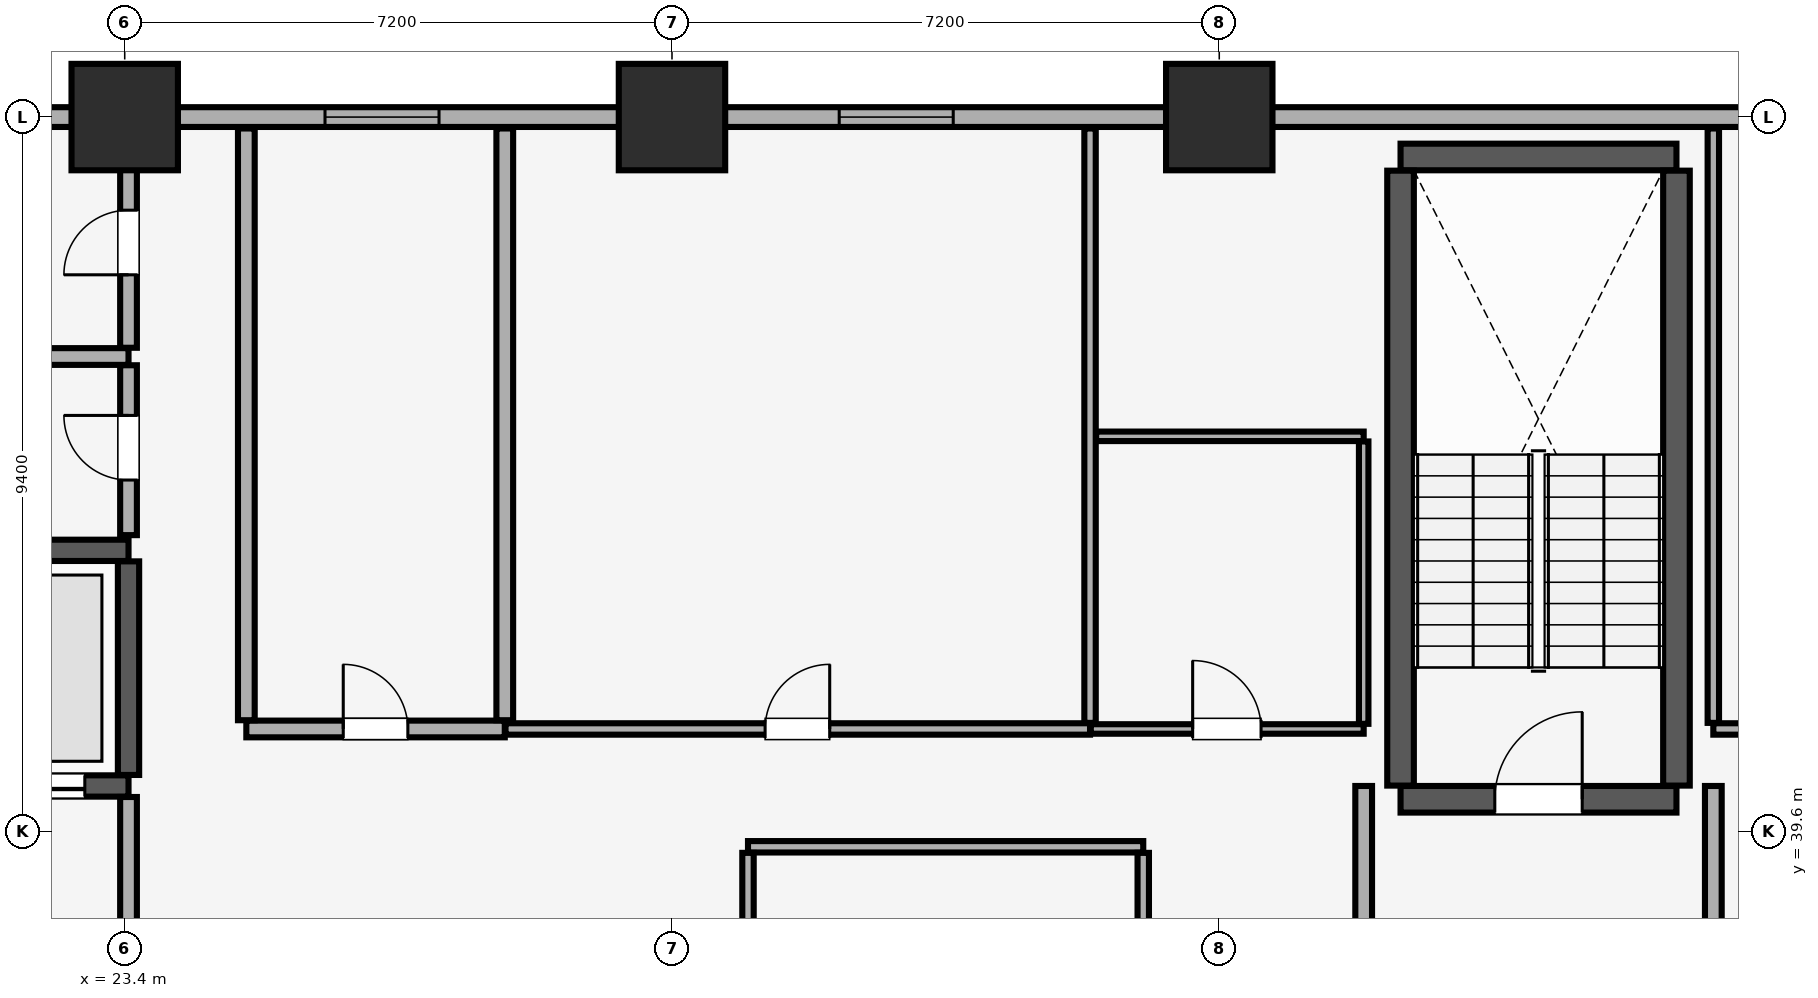
"""IFC4 building model, lengths in metres.
Left out: names, types, materials, properties, quantities, classifications, styles, units other than length and angle.
Written with IfcOpenShell. Run it as: python <this file> out.ifc"""

import sys

from ifc_helpers import new_model, si_unit, direction, frame, frame_2d, origin, origin_2d, place, context, subcontext, project, spatial, rectangle, extrude, element, fill, save


model = new_model("IFC4")
c1 = context("Model", 3, precision=1e-05, world=origin(), true_north=direction((0.0, 1.0)))
c2 = subcontext(c1, "Body", "Model", "MODEL_VIEW")
j1 = project(units=[si_unit("LENGTHUNIT", "METRE"), si_unit("PLANEANGLEUNIT", "RADIAN")], contexts=[c1])
p1 = place(None, origin())
s1 = spatial("IfcSite", under=j1, at=p1, CompositionType="ELEMENT")
p2 = place(p1, origin())
s2 = spatial("IfcBuilding", under=s1, at=p2, CompositionType="ELEMENT")
p3 = place(p2, frame((0.0, 0.0, 57.65)))
s3 = spatial("IfcBuildingStorey", under=s2, at=p3, CompositionType="ELEMENT", Elevation=57.65)
for number, where, z_axis, x_axis in (
    (1, (23.4, 49.0, 0.0), (0.0, 0.0, 1.0), (1.0, 0.0, 0.0)),
    (2, (30.6, 49.0, 0.0), (0.0, 0.0, 1.0), (1.0, 0.0, 0.0)),
    (3, (37.8, 49.0, 0.0), (0.0, 0.0, 1.0), (1.0, 0.0, 0.0)),
):
    element("IfcColumn", number, at=place(p3, frame(where, z_axis=z_axis, x_axis=x_axis)), inside=s3, PredefinedType="COLUMN", context=c2, shape_type="SweptSolid", body=[
        extrude(rectangle(XDim=1.4, YDim=1.4, at=origin_2d()), origin(), (0.0, 0.0, 1.0), 3.51),
    ])
p4 = place(p3, frame((79.8, 49.0, 0.0), z_axis=(0.0, 0.0, 1.0), x_axis=(-1.0, 0.0, 0.0)))
e4 = element("IfcWall", 4, at=p4, inside=s3, PredefinedType="SOLIDWALL", context=c2, shape_type="SweptSolid", body=[
    extrude(rectangle(XDim=75.6, YDim=0.26, at=frame_2d((37.8, 0.0))), origin(), (0.0, 0.0, 1.0), 2.56),
])
p5 = place(p4, frame((72.565, 0.0, 0.85)))
e5 = element("IfcOpeningElement", 5, at=p5, cuts=e4, PredefinedType="OPENING", context=c2, shape_type="SweptSolid", body=[
    extrude(rectangle(XDim=1.5, YDim=1.4, at=frame_2d((0.75, 0.7))), frame((0.0, 0.14, 0.0), z_axis=(0.0, -1.0, 0.0), x_axis=(1.0, 0.0, 0.0)), (0.0, 0.0, 1.0), 0.28),
])
p6 = place(p4, frame((67.45, 0.0, 0.85)))
e6 = element("IfcOpeningElement", 6, at=p6, cuts=e4, PredefinedType="OPENING", context=c2, shape_type="SweptSolid", body=[
    extrude(rectangle(XDim=1.5, YDim=1.4, at=frame_2d((0.75, 0.7))), frame((0.0, 0.14, 0.0), z_axis=(0.0, -1.0, 0.0), x_axis=(1.0, 0.0, 0.0)), (0.0, 0.0, 1.0), 0.28),
])
p7 = place(p4, frame((7.6, 0.0, 0.85)))
e7 = element("IfcOpeningElement", 7, at=p7, cuts=e4, PredefinedType="OPENING", context=c2, shape_type="SweptSolid", body=[
    extrude(rectangle(XDim=1.5, YDim=1.4, at=frame_2d((0.75, 0.7))), frame((0.0, 0.14, 0.0), z_axis=(0.0, -1.0, 0.0), x_axis=(1.0, 0.0, 0.0)), (0.0, 0.0, 1.0), 0.28),
])
p8 = place(p4, frame((1.535, 0.0, 0.85)))
e8 = element("IfcOpeningElement", 8, at=p8, cuts=e4, PredefinedType="OPENING", context=c2, shape_type="SweptSolid", body=[
    extrude(rectangle(XDim=1.5, YDim=1.4, at=frame_2d((0.75, 0.7))), frame((0.0, 0.14, 0.0), z_axis=(0.0, -1.0, 0.0), x_axis=(1.0, 0.0, 0.0)), (0.0, 0.0, 1.0), 0.28),
])
p9 = place(p4, frame((52.265, 0.0, 0.9)))
e9 = element("IfcOpeningElement", 9, at=p9, cuts=e4, PredefinedType="OPENING", context=c2, shape_type="SweptSolid", body=[
    extrude(rectangle(XDim=1.5, YDim=1.4, at=frame_2d((0.75, 0.7))), frame((0.0, 0.14, 0.0), z_axis=(0.0, -1.0, 0.0), x_axis=(1.0, 0.0, 0.0)), (0.0, 0.0, 1.0), 0.28),
])
p10 = place(p4, frame((45.5, 0.0, 0.9)))
e10 = element("IfcOpeningElement", 10, at=p10, cuts=e4, PredefinedType="OPENING", context=c2, shape_type="SweptSolid", body=[
    extrude(rectangle(XDim=1.5, YDim=1.4, at=frame_2d((0.75, 0.7))), frame((0.0, 0.14, 0.0), z_axis=(0.0, -1.0, 0.0), x_axis=(1.0, 0.0, 0.0)), (0.0, 0.0, 1.0), 0.28),
])
p11 = place(p4, frame((31.05, 0.0, 0.9)))
e11 = element("IfcOpeningElement", 11, at=p11, cuts=e4, PredefinedType="OPENING", context=c2, shape_type="SweptSolid", body=[
    extrude(rectangle(XDim=1.5, YDim=1.4, at=frame_2d((0.75, 0.7))), frame((0.0, 0.14, 0.0), z_axis=(0.0, -1.0, 0.0), x_axis=(1.0, 0.0, 0.0)), (0.0, 0.0, 1.0), 0.28),
])
p12 = place(p4, frame((27.85, 0.0, 0.9)))
e12 = element("IfcOpeningElement", 12, at=p12, cuts=e4, PredefinedType="OPENING", context=c2, shape_type="SweptSolid", body=[
    extrude(rectangle(XDim=1.5, YDim=1.4, at=frame_2d((0.75, 0.7))), frame((0.0, 0.14, 0.0), z_axis=(0.0, -1.0, 0.0), x_axis=(1.0, 0.0, 0.0)), (0.0, 0.0, 1.0), 0.28),
])
p13 = place(p4, frame((23.485, 0.0, 0.9)))
e13 = element("IfcOpeningElement", 13, at=p13, cuts=e4, PredefinedType="OPENING", context=c2, shape_type="SweptSolid", body=[
    extrude(rectangle(XDim=1.5, YDim=1.4, at=frame_2d((0.75, 0.7))), frame((0.0, 0.14, 0.0), z_axis=(0.0, -1.0, 0.0), x_axis=(1.0, 0.0, 0.0)), (0.0, 0.0, 1.0), 0.28),
])
p14 = place(p3, frame((40.185, 40.025, 0.0), z_axis=(0.0, 0.0, 1.0), x_axis=(1.0, 0.0, 0.0)))
e14 = element("IfcWall", 14, at=p14, inside=s3, PredefinedType="SHEAR", context=c2, shape_type="SweptSolid", body=[
    extrude(rectangle(XDim=3.63, YDim=0.35, at=frame_2d((1.815, 0.0))), origin(), (0.0, 0.0, 1.0), 3.51),
])
p15 = place(p14, frame((1.24, 0.0, 0.0)))
e15 = element("IfcOpeningElement", 15, at=p15, cuts=e14, PredefinedType="OPENING", context=c2, shape_type="SweptSolid", body=[
    extrude(rectangle(XDim=1.15, YDim=2.15, at=frame_2d((0.575, 1.075))), frame((0.0, 0.185, 0.0), z_axis=(0.0, -1.0, 0.0), x_axis=(1.0, 0.0, 0.0)), (0.0, 0.0, 1.0), 0.37),
])
p16 = place(p3, frame((40.185, 48.475, 0.0), z_axis=(0.0, 0.0, 1.0), x_axis=(1.0, 0.0, 0.0)))
e16 = element("IfcWall", 16, at=p16, inside=s3, PredefinedType="SHEAR", context=c2, shape_type="SweptSolid", body=[
    extrude(rectangle(XDim=3.63, YDim=0.35, at=frame_2d((1.815, 0.0))), origin(), (0.0, 0.0, 1.0), 3.51),
])
for number, where, z_axis, x_axis in (
    (17, (40.185, 40.205, 0.0), (0.0, 0.0, 1.0), (0.0, 1.0, 0.0)),
    (18, (43.815, 40.205, 0.0), (0.0, 0.0, 1.0), (0.0, 1.0, 0.0)),
):
    element("IfcWall", number, at=place(p3, frame(where, z_axis=z_axis, x_axis=x_axis)), inside=s3, PredefinedType="SHEAR", context=c2, shape_type="SweptSolid", body=[
        extrude(rectangle(XDim=8.09, YDim=0.35, at=frame_2d((4.045, 0.0))), origin(), (0.0, 0.0, 1.0), 3.51),
    ])
p17 = place(p3, frame((21.035, 40.2, 0.0), z_axis=(0.0, 0.0, 1.0), x_axis=(1.0, 0.0, 0.0)))
e19 = element("IfcWall", 19, at=p17, inside=s3, PredefinedType="SHEAR", context=c2, shape_type="SweptSolid", body=[
    extrude(rectangle(XDim=2.415, YDim=0.28, at=frame_2d((1.208, 0.0))), origin(), (0.0, 0.0, 1.0), 3.51),
])
p18 = place(p17, frame((0.54, 0.0, 0.0)))
e20 = element("IfcOpeningElement", 20, at=p18, cuts=e19, PredefinedType="OPENING", context=c2, shape_type="SweptSolid", body=[
    extrude(rectangle(XDim=1.3, YDim=2.3, at=frame_2d((0.65, 1.15))), frame((0.0, 0.15, 0.0), z_axis=(0.0, -1.0, 0.0), x_axis=(1.0, 0.0, 0.0)), (0.0, 0.0, 1.0), 0.3),
])
p19 = place(p3, frame((21.035, 43.3, 0.0), z_axis=(0.0, 0.0, 1.0), x_axis=(1.0, 0.0, 0.0)))
e21 = element("IfcWall", 21, at=p19, inside=s3, PredefinedType="SHEAR", context=c2, shape_type="SweptSolid", body=[
    extrude(rectangle(XDim=2.415, YDim=0.28, at=frame_2d((1.208, 0.0))), origin(), (0.0, 0.0, 1.0), 3.51),
])
p20 = place(p3, frame((23.45, 40.345, 0.0), z_axis=(0.0, 0.0, 1.0), x_axis=(0.0, 1.0, 0.0)))
e22 = element("IfcWall", 22, at=p20, inside=s3, PredefinedType="SHEAR", context=c2, shape_type="SweptSolid", body=[
    extrude(rectangle(XDim=2.81, YDim=0.28, at=frame_2d((1.405, 0.0))), origin(), (0.0, 0.0, 1.0), 3.51),
])
p21 = place(p3, frame((23.45, 34.415, 0.0), z_axis=(0.0, 0.0, 1.0), x_axis=(0.0, 1.0, 0.0)))
e23 = element("IfcWall", 23, at=p21, inside=s3, PredefinedType="PARTITIONING", context=c2, shape_type="SweptSolid", body=[
    extrude(rectangle(XDim=5.64, YDim=0.22, at=frame_2d((2.82, 0.0))), origin(), (0.0, 0.0, 1.0), 3.51),
])
for number, where, z_axis, x_axis in (
    (24, (39.7, 34.415, 0.0), (0.0, 0.0, 1.0), (0.0, 1.0, 0.0)),
    (25, (44.3, 34.415, 0.0), (0.0, 0.0, 1.0), (0.0, 1.0, 0.0)),
):
    element("IfcWall", number, at=place(p3, frame(where, z_axis=z_axis, x_axis=x_axis)), inside=s3, PredefinedType="PARTITIONING", context=c2, shape_type="SweptSolid", body=[
        extrude(rectangle(XDim=5.785, YDim=0.22, at=frame_2d((2.893, 0.0))), origin(), (0.0, 0.0, 1.0), 3.51),
    ])
p22 = place(p3, frame((21.035, 45.85, 0.0), z_axis=(0.0, 0.0, 1.0), x_axis=(1.0, 0.0, 0.0)))
e26 = element("IfcWall", 26, at=p22, inside=s3, PredefinedType="PARTITIONING", context=c2, shape_type="SweptSolid", body=[
    extrude(rectangle(XDim=2.415, YDim=0.22, at=frame_2d((1.208, 0.0))), origin(), (0.0, 0.0, 1.0), 3.51),
])
p23 = place(p3, frame((23.45, 43.5, 0.0), z_axis=(0.0, 0.0, 1.0), x_axis=(0.0, 1.0, 0.0)))
e27 = element("IfcWall", 27, at=p23, inside=s3, PredefinedType="PARTITIONING", context=c2, shape_type="SweptSolid", body=[
    extrude(rectangle(XDim=2.235, YDim=0.22, at=frame_2d((1.118, 0.0))), origin(), (0.0, 0.0, 1.0), 3.51),
])
p24 = place(p23, frame((0.725, 0.0, 0.0)))
e28 = element("IfcOpeningElement", 28, at=p24, cuts=e27, PredefinedType="OPENING", context=c2, shape_type="SweptSolid", body=[
    extrude(rectangle(XDim=0.85, YDim=2.1, at=frame_2d((0.425, 1.05))), frame((0.0, 0.12, 0.0), z_axis=(0.0, -1.0, 0.0), x_axis=(1.0, 0.0, 0.0)), (0.0, 0.0, 1.0), 0.24),
])
p25 = place(p3, frame((23.45, 45.965, 0.0), z_axis=(0.0, 0.0, 1.0), x_axis=(0.0, 1.0, 0.0)))
e29 = element("IfcWall", 29, at=p25, inside=s3, PredefinedType="PARTITIONING", context=c2, shape_type="SweptSolid", body=[
    extrude(rectangle(XDim=2.885, YDim=0.22, at=frame_2d((1.442, 0.0))), origin(), (0.0, 0.0, 1.0), 3.51),
])
p26 = place(p25, frame((0.96, 0.0, 0.0)))
e30 = element("IfcOpeningElement", 30, at=p26, cuts=e29, PredefinedType="OPENING", context=c2, shape_type="SweptSolid", body=[
    extrude(rectangle(XDim=0.85, YDim=2.1, at=frame_2d((0.425, 1.05))), frame((0.0, 0.12, 0.0), z_axis=(0.0, -1.0, 0.0), x_axis=(1.0, 0.0, 0.0)), (0.0, 0.0, 1.0), 0.24),
])
p27 = place(p3, frame((31.6, 39.4, 0.0), z_axis=(0.0, 0.0, 1.0), x_axis=(1.0, 0.0, 0.0)))
e31 = element("IfcWall", 31, at=p27, inside=s3, PredefinedType="PARTITIONING", context=c2, shape_type="SweptSolid", body=[
    extrude(rectangle(XDim=5.2, YDim=0.15, at=frame_2d((2.6, 0.0))), origin(), (0.0, 0.0, 1.0), 3.51),
])
for number, where, z_axis, x_axis in (
    (32, (31.6, 34.38, 0.0), (0.0, 0.0, 1.0), (0.0, 1.0, 0.0)),
    (33, (36.8, 34.38, 0.0), (0.0, 0.0, 1.0), (0.0, 1.0, 0.0)),
):
    element("IfcWall", number, at=place(p3, frame(where, z_axis=z_axis, x_axis=x_axis)), inside=s3, PredefinedType="PARTITIONING", context=c2, shape_type="SweptSolid", body=[
        extrude(rectangle(XDim=4.94, YDim=0.15, at=frame_2d((2.47, 0.0))), origin(), (0.0, 0.0, 1.0), 3.51),
    ])
p28 = place(p3, frame((25.0, 40.95, 0.0), z_axis=(0.0, 0.0, 1.0), x_axis=(1.0, 0.0, 0.0)))
e34 = element("IfcWall", 34, at=p28, inside=s3, PredefinedType="PARTITIONING", context=c2, shape_type="SweptSolid", body=[
    extrude(rectangle(XDim=3.4, YDim=0.22, at=frame_2d((1.7, 0.0))), origin(), (0.0, 0.0, 1.0), 3.51),
])
p29 = place(p28, frame((1.275, 0.0, 0.0)))
e35 = element("IfcOpeningElement", 35, at=p29, cuts=e34, PredefinedType="OPENING", context=c2, shape_type="SweptSolid", body=[
    extrude(rectangle(XDim=0.85, YDim=2.1, at=frame_2d((0.425, 1.05))), frame((0.0, 0.12, 0.0), z_axis=(0.0, -1.0, 0.0), x_axis=(1.0, 0.0, 0.0)), (0.0, 0.0, 1.0), 0.24),
])
for number, where, z_axis, x_axis in (
    (36, (25.0, 41.065, 0.0), (0.0, 0.0, 1.0), (0.0, 1.0, 0.0)),
    (37, (28.4, 41.065, 0.0), (0.0, 0.0, 1.0), (0.0, 1.0, 0.0)),
):
    element("IfcWall", number, at=place(p3, frame(where, z_axis=z_axis, x_axis=x_axis)), inside=s3, PredefinedType="PARTITIONING", context=c2, shape_type="SweptSolid", body=[
        extrude(rectangle(XDim=7.785, YDim=0.22, at=frame_2d((3.893, 0.0))), origin(), (0.0, 0.0, 1.0), 3.51),
    ])
p30 = place(p3, frame((28.41, 40.95, 0.0), z_axis=(0.0, 0.0, 1.0), x_axis=(1.0, 0.0, 0.0)))
e38 = element("IfcWall", 38, at=p30, inside=s3, PredefinedType="PARTITIONING", context=c2, shape_type="SweptSolid", body=[
    extrude(rectangle(XDim=7.69, YDim=0.15, at=frame_2d((3.845, 0.0))), origin(), (0.0, 0.0, 1.0), 3.51),
])
p31 = place(p30, frame((3.415, 0.0, 0.0)))
e39 = element("IfcOpeningElement", 39, at=p31, cuts=e38, PredefinedType="OPENING", context=c2, shape_type="SweptSolid", body=[
    extrude(rectangle(XDim=0.85, YDim=2.1, at=frame_2d((0.425, 1.05))), frame((0.0, 0.085, 0.0), z_axis=(0.0, -1.0, 0.0), x_axis=(1.0, 0.0, 0.0)), (0.0, 0.0, 1.0), 0.17),
])
p32 = place(p3, frame((36.1, 41.03, 0.0), z_axis=(0.0, 0.0, 1.0), x_axis=(0.0, 1.0, 0.0)))
e40 = element("IfcWall", 40, at=p32, inside=s3, PredefinedType="PARTITIONING", context=c2, shape_type="SweptSolid", body=[
    extrude(rectangle(XDim=7.82, YDim=0.15, at=frame_2d((3.91, 0.0))), origin(), (0.0, 0.0, 1.0), 3.51),
])
p33 = place(p3, frame((36.11, 40.95, 0.0), z_axis=(0.0, 0.0, 1.0), x_axis=(1.0, 0.0, 0.0)))
e41 = element("IfcWall", 41, at=p33, inside=s3, PredefinedType="PARTITIONING", context=c2, shape_type="SweptSolid", body=[
    extrude(rectangle(XDim=3.59, YDim=0.125, at=frame_2d((1.795, 0.0))), origin(), (0.0, 0.0, 1.0), 3.51),
])
p34 = place(p33, frame((1.34, 0.0, 0.0)))
e42 = element("IfcOpeningElement", 42, at=p34, cuts=e41, PredefinedType="OPENING", context=c2, shape_type="SweptSolid", body=[
    extrude(rectangle(XDim=0.9, YDim=2.1, at=frame_2d((0.45, 1.05))), frame((0.0, 0.073, 0.0), z_axis=(0.0, -1.0, 0.0), x_axis=(1.0, 0.0, 0.0)), (0.0, 0.0, 1.0), 0.145),
])
p35 = place(p3, frame((36.18, 44.8, 0.0), z_axis=(0.0, 0.0, 1.0), x_axis=(1.0, 0.0, 0.0)))
e43 = element("IfcWall", 43, at=p35, inside=s3, PredefinedType="PARTITIONING", context=c2, shape_type="SweptSolid", body=[
    extrude(rectangle(XDim=3.52, YDim=0.125, at=frame_2d((1.76, 0.0))), origin(), (0.0, 0.0, 1.0), 3.51),
])
p36 = place(p3, frame((39.7, 41.018, 0.0), z_axis=(0.0, 0.0, 1.0), x_axis=(0.0, 1.0, 0.0)))
e44 = element("IfcWall", 44, at=p36, inside=s3, PredefinedType="PARTITIONING", context=c2, shape_type="SweptSolid", body=[
    extrude(rectangle(XDim=3.715, YDim=0.125, at=frame_2d((1.857, 0.0))), origin(), (0.0, 0.0, 1.0), 3.51),
])
p37 = place(p3, frame((44.3, 40.95, 0.0), z_axis=(0.0, 0.0, 1.0), x_axis=(1.0, 0.0, 0.0)))
e45 = element("IfcWall", 45, at=p37, inside=s3, PredefinedType="PARTITIONING", context=c2, shape_type="SweptSolid", body=[
    extrude(rectangle(XDim=5.1, YDim=0.15, at=frame_2d((2.55, 0.0))), origin(), (0.0, 0.0, 1.0), 3.51),
])
p38 = place(p37, frame((2.875, 0.0, 0.0)))
e46 = element("IfcOpeningElement", 46, at=p38, cuts=e45, PredefinedType="OPENING", context=c2, shape_type="SweptSolid", body=[
    extrude(rectangle(XDim=0.85, YDim=2.1, at=frame_2d((0.425, 1.05))), frame((0.0, 0.085, 0.0), z_axis=(0.0, -1.0, 0.0), x_axis=(1.0, 0.0, 0.0)), (0.0, 0.0, 1.0), 0.17),
])
p39 = place(p3, frame((44.3, 41.03, 0.0), z_axis=(0.0, 0.0, 1.0), x_axis=(0.0, 1.0, 0.0)))
e47 = element("IfcWall", 47, at=p39, inside=s3, PredefinedType="PARTITIONING", context=c2, shape_type="SweptSolid", body=[
    extrude(rectangle(XDim=7.82, YDim=0.15, at=frame_2d((3.91, 0.0))), origin(), (0.0, 0.0, 1.0), 3.51),
])
p40 = place(p9, origin())
e48 = element("IfcWindow", 48, at=p40, inside=s3, PartitioningType="SINGLE_PANEL", PredefinedType="WINDOW", context=c2, shape_type="SweptSolid", body=[
    extrude(rectangle(XDim=1.5, YDim=1.4, at=frame_2d((0.75, 0.7))), frame((0.0, 0.03, 0.0), z_axis=(0.0, -1.0, 0.0), x_axis=(1.0, 0.0, 0.0)), (0.0, 0.0, 1.0), 0.06),
])
fill(e9, e48)
p41 = place(p10, origin())
e49 = element("IfcWindow", 49, at=p41, inside=s3, PartitioningType="SINGLE_PANEL", PredefinedType="WINDOW", context=c2, shape_type="SweptSolid", body=[
    extrude(rectangle(XDim=1.5, YDim=1.4, at=frame_2d((0.75, 0.7))), frame((0.0, 0.03, 0.0), z_axis=(0.0, -1.0, 0.0), x_axis=(1.0, 0.0, 0.0)), (0.0, 0.0, 1.0), 0.06),
])
fill(e10, e49)
p42 = place(p15, origin())
e50 = element("IfcDoor", 50, at=p42, inside=s3, OperationType="SINGLE_SWING_RIGHT", PredefinedType="DOOR", context=c2, shape_type="SweptSolid", body=[
    extrude(rectangle(XDim=1.15, YDim=2.15, at=frame_2d((0.575, 1.075))), frame((0.0, 0.025, 0.0), z_axis=(0.0, -1.0, 0.0), x_axis=(1.0, 0.0, 0.0)), (0.0, 0.0, 1.0), 0.05),
])
fill(e15, e50)
p43 = place(p18, origin())
e51 = element("IfcDoor", 51, at=p43, inside=s3, OperationType="DOUBLE_DOOR_SLIDING", PredefinedType="DOOR", context=c2, shape_type="SweptSolid", body=[
    extrude(rectangle(XDim=1.3, YDim=2.3, at=frame_2d((0.65, 1.15))), frame((0.0, 0.025, 0.0), z_axis=(0.0, -1.0, 0.0), x_axis=(1.0, 0.0, 0.0)), (0.0, 0.0, 1.0), 0.05),
])
fill(e20, e51)
p44 = place(p24, origin())
e52 = element("IfcDoor", 52, at=p44, inside=s3, OperationType="SINGLE_SWING_RIGHT", PredefinedType="DOOR", context=c2, shape_type="SweptSolid", body=[
    extrude(rectangle(XDim=0.85, YDim=2.1, at=frame_2d((0.425, 1.05))), frame((0.0, 0.025, 0.0), z_axis=(0.0, -1.0, 0.0), x_axis=(1.0, 0.0, 0.0)), (0.0, 0.0, 1.0), 0.05),
])
fill(e28, e52)
p45 = place(p26, origin())
e53 = element("IfcDoor", 53, at=p45, inside=s3, OperationType="SINGLE_SWING_LEFT", PredefinedType="DOOR", context=c2, shape_type="SweptSolid", body=[
    extrude(rectangle(XDim=0.85, YDim=2.1, at=frame_2d((0.425, 1.05))), frame((0.0, 0.025, 0.0), z_axis=(0.0, -1.0, 0.0), x_axis=(1.0, 0.0, 0.0)), (0.0, 0.0, 1.0), 0.05),
])
fill(e30, e53)
p46 = place(p29, origin())
e54 = element("IfcDoor", 54, at=p46, inside=s3, OperationType="SINGLE_SWING_LEFT", PredefinedType="DOOR", context=c2, shape_type="SweptSolid", body=[
    extrude(rectangle(XDim=0.85, YDim=2.1, at=frame_2d((0.425, 1.05))), frame((0.0, 0.025, 0.0), z_axis=(0.0, -1.0, 0.0), x_axis=(1.0, 0.0, 0.0)), (0.0, 0.0, 1.0), 0.05),
])
fill(e35, e54)
p47 = place(p31, origin())
e55 = element("IfcDoor", 55, at=p47, inside=s3, OperationType="SINGLE_SWING_RIGHT", PredefinedType="DOOR", context=c2, shape_type="SweptSolid", body=[
    extrude(rectangle(XDim=0.85, YDim=2.1, at=frame_2d((0.425, 1.05))), frame((0.0, 0.025, 0.0), z_axis=(0.0, -1.0, 0.0), x_axis=(1.0, 0.0, 0.0)), (0.0, 0.0, 1.0), 0.05),
])
fill(e39, e55)
p48 = place(p34, origin())
e56 = element("IfcDoor", 56, at=p48, inside=s3, OperationType="SINGLE_SWING_LEFT", PredefinedType="DOOR", context=c2, shape_type="SweptSolid", body=[
    extrude(rectangle(XDim=0.9, YDim=2.1, at=frame_2d((0.45, 1.05))), frame((0.0, 0.025, 0.0), z_axis=(0.0, -1.0, 0.0), x_axis=(1.0, 0.0, 0.0)), (0.0, 0.0, 1.0), 0.05),
])
fill(e42, e56)
save(model, sys.argv[1])
